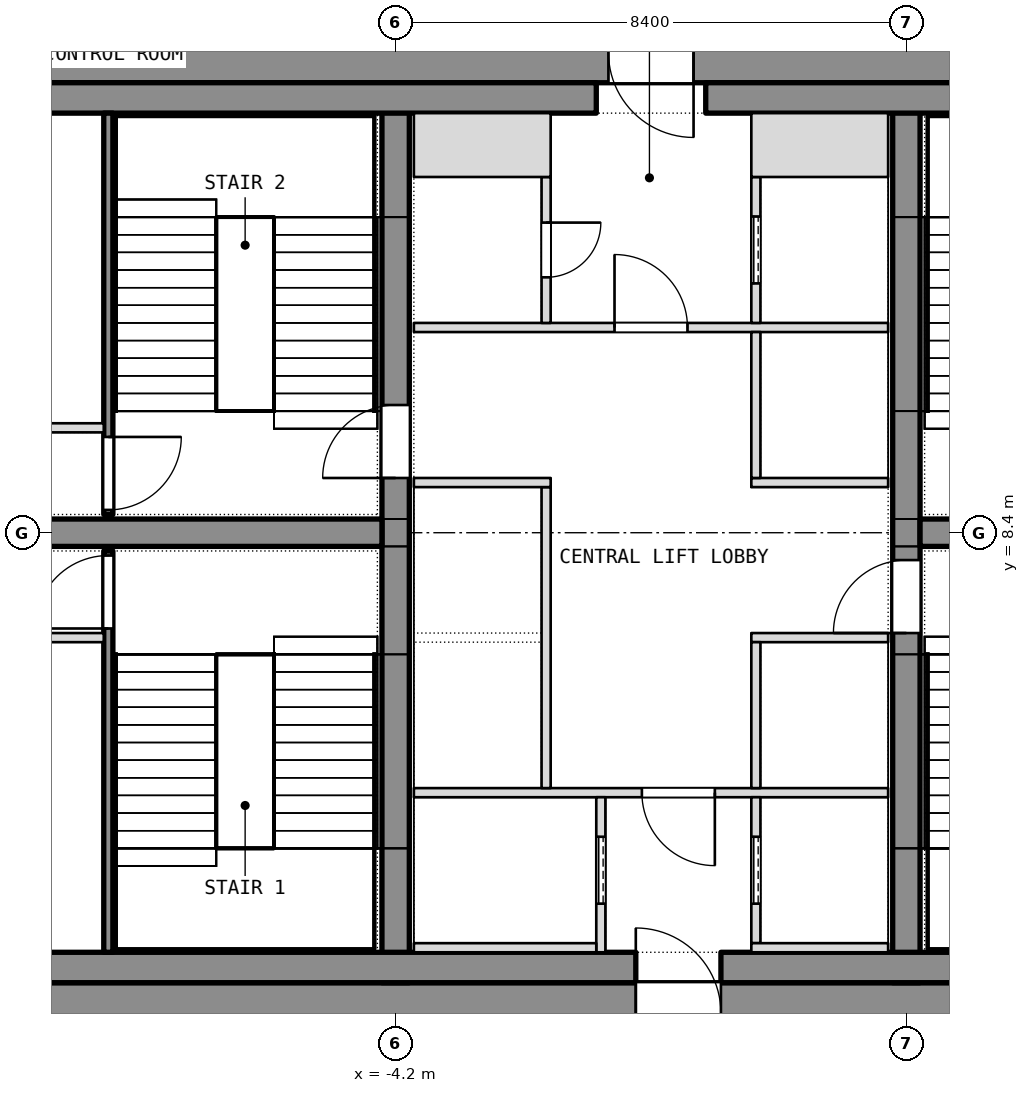
"""IFC4 building model, lengths in metres.
Left out: names, types, materials, properties, quantities, classifications, styles, units other than length and angle.
Written with IfcOpenShell. Run it as: python <this file> out.ifc"""

import sys

from ifc_helpers import new_model, si_unit, direction, frame, frame_2d, origin, place, context, subcontext, project, spatial, rectangle, extrude, element, fill, save


model = new_model("IFC4")
c1 = context("Model", 3, precision=1e-05, world=origin(), true_north=direction((0.0, 1.0)))
c2 = subcontext(c1, "Body", "Model", "MODEL_VIEW")
j1 = project(units=[si_unit("LENGTHUNIT", "METRE"), si_unit("PLANEANGLEUNIT", "RADIAN")], contexts=[c1])
p1 = place(None, origin())
s1 = spatial("IfcSite", under=j1, at=p1, CompositionType="ELEMENT")
p2 = place(p1, origin())
s2 = spatial("IfcBuilding", under=s1, at=p2, CompositionType="ELEMENT")
p3 = place(p2, frame((0.0, 0.0, 169.7)))
s3 = spatial("IfcBuildingStorey", under=s2, at=p3, CompositionType="ELEMENT", Elevation=169.7)
p4 = place(p3, frame((-11.1, 0.5, 0.0), z_axis=(0.0, 0.0, 1.0), x_axis=(1.0, 0.0, 0.0)))
e1 = element("IfcWall", 1, at=p4, inside=s3, PredefinedType="SHEAR", context=c2, shape_type="SweptSolid", body=[
    extrude(rectangle(XDim=22.2, YDim=1.0, at=frame_2d((11.1, 0.0))), origin(), (0.0, 0.0, 1.0), 10.8),
])
p5 = place(p4, frame((10.85, 0.0, 0.0)))
e2 = element("IfcOpeningElement", 2, at=p5, cuts=e1, PredefinedType="OPENING", context=c2, shape_type="SweptSolid", body=[
    extrude(rectangle(XDim=1.4, YDim=2.1, at=frame_2d((0.7, 1.05))), frame((0.0, 0.5, 0.0), z_axis=(0.0, -1.0, 0.0), x_axis=(1.0, 0.0, 0.0)), (0.0, 0.0, 1.0), 1.0),
])
p6 = place(p3, frame((-11.1, 16.3, 0.0), z_axis=(0.0, 0.0, 1.0), x_axis=(1.0, 0.0, 0.0)))
e3 = element("IfcWall", 3, at=p6, inside=s3, PredefinedType="SHEAR", context=c2, shape_type="SweptSolid", body=[
    extrude(rectangle(XDim=22.2, YDim=1.0, at=frame_2d((11.1, 0.0))), origin(), (0.0, 0.0, 1.0), 10.8),
])
p7 = place(p6, frame((10.4, 0.0, 0.0)))
e4 = element("IfcOpeningElement", 4, at=p7, cuts=e3, PredefinedType="OPENING", context=c2, shape_type="SweptSolid", body=[
    extrude(rectangle(XDim=1.4, YDim=2.1, at=frame_2d((0.7, 1.05))), frame((0.0, 0.5, 0.0), z_axis=(0.0, -1.0, 0.0), x_axis=(1.0, 0.0, 0.0)), (0.0, 0.0, 1.0), 1.0),
])
p8 = place(p3, frame((-4.2, 1.0, 0.0), z_axis=(0.0, 0.0, 1.0), x_axis=(0.0, 1.0, 0.0)))
e5 = element("IfcWall", 5, at=p8, inside=s3, PredefinedType="SHEAR", context=c2, shape_type="SweptSolid", body=[
    extrude(rectangle(XDim=14.8, YDim=0.45, at=frame_2d((7.4, 0.0))), origin(), (0.0, 0.0, 1.0), 10.8),
])
p9 = place(p8, frame((8.3, 0.0, 0.0)))
e6 = element("IfcOpeningElement", 6, at=p9, cuts=e5, PredefinedType="OPENING", context=c2, shape_type="SweptSolid", body=[
    extrude(rectangle(XDim=1.2, YDim=2.1, at=frame_2d((0.6, 1.05))), frame((0.0, 0.225, 0.0), z_axis=(0.0, -1.0, 0.0), x_axis=(1.0, 0.0, 0.0)), (0.0, 0.0, 1.0), 0.45),
])
p10 = place(p3, frame((4.2, 1.0, 0.0), z_axis=(0.0, 0.0, 1.0), x_axis=(0.0, 1.0, 0.0)))
e7 = element("IfcWall", 7, at=p10, inside=s3, PredefinedType="SHEAR", context=c2, shape_type="SweptSolid", body=[
    extrude(rectangle(XDim=14.8, YDim=0.45, at=frame_2d((7.4, 0.0))), origin(), (0.0, 0.0, 1.0), 10.8),
])
p11 = place(p10, frame((5.75, 0.0, 0.0)))
e8 = element("IfcOpeningElement", 8, at=p11, cuts=e7, PredefinedType="OPENING", context=c2, shape_type="SweptSolid", body=[
    extrude(rectangle(XDim=1.2, YDim=2.1, at=frame_2d((0.6, 1.05))), frame((0.0, 0.225, 0.0), z_axis=(0.0, -1.0, 0.0), x_axis=(1.0, 0.0, 0.0)), (0.0, 0.0, 1.0), 0.45),
])
for number, where, z_axis, x_axis in (
    (9, (-11.1, 8.4, 0.0), (0.0, 0.0, 1.0), (1.0, 0.0, 0.0)),
    (10, (4.425, 8.4, 0.0), (0.0, 0.0, 1.0), (1.0, 0.0, 0.0)),
):
    element("IfcWall", number, at=place(p3, frame(where, z_axis=z_axis, x_axis=x_axis)), inside=s3, PredefinedType="SHEAR", context=c2, shape_type="SweptSolid", body=[
        extrude(rectangle(XDim=6.675, YDim=0.45, at=frame_2d((3.337, 0.0))), origin(), (0.0, 0.0, 1.0), 10.8),
    ])
p12 = place(p3, frame((-11.1, 1.25, 0.0), z_axis=(0.0, 0.0, 1.0), x_axis=(1.0, 0.0, 0.0)))
e11 = element("IfcWall", 11, at=p12, inside=s3, PredefinedType="PARTITIONING", context=c2, shape_type="SweptSolid", body=[
    extrude(rectangle(XDim=10.85, YDim=0.5, at=frame_2d((5.425, 0.0))), origin(), (0.0, 0.0, 1.0), 10.54),
])
p13 = place(p3, frame((1.15, 1.25, 0.0), z_axis=(0.0, 0.0, 1.0), x_axis=(1.0, 0.0, 0.0)))
e12 = element("IfcWall", 12, at=p13, inside=s3, PredefinedType="PARTITIONING", context=c2, shape_type="SweptSolid", body=[
    extrude(rectangle(XDim=9.95, YDim=0.5, at=frame_2d((4.975, 0.0))), origin(), (0.0, 0.0, 1.0), 10.54),
])
for number, where, z_axis, x_axis in (
    (13, (-11.1, 15.55, 0.0), (0.0, 0.0, 1.0), (1.0, 0.0, 0.0)),
    (14, (0.9, 15.55, 0.0), (0.0, 0.0, 1.0), (1.0, 0.0, 0.0)),
):
    element("IfcWall", number, at=place(p3, frame(where, z_axis=z_axis, x_axis=x_axis)), inside=s3, PredefinedType="PARTITIONING", context=c2, shape_type="SweptSolid", body=[
        extrude(rectangle(XDim=10.2, YDim=0.5, at=frame_2d((5.1, 0.0))), origin(), (0.0, 0.0, 1.0), 10.54),
    ])
p14 = place(p3, frame((-8.925, 1.5, 0.0), z_axis=(0.0, 0.0, 1.0), x_axis=(0.0, 1.0, 0.0)))
e15 = element("IfcWall", 15, at=p14, inside=s3, PredefinedType="SHEAR", context=c2, shape_type="SweptSolid", body=[
    extrude(rectangle(XDim=6.6, YDim=0.15, at=frame_2d((3.3, 0.0))), origin(), (0.0, 0.0, 1.0), 10.54),
])
p15 = place(p14, frame((5.325, 0.0, 0.0)))
e16 = element("IfcOpeningElement", 16, at=p15, cuts=e15, PredefinedType="OPENING", context=c2, shape_type="SweptSolid", body=[
    extrude(rectangle(XDim=1.2, YDim=2.1, at=frame_2d((0.6, 1.05))), frame((0.0, 0.075, 0.0), z_axis=(0.0, -1.0, 0.0), x_axis=(1.0, 0.0, 0.0)), (0.0, 0.0, 1.0), 0.15),
])
p16 = place(p3, frame((-11.1, 6.675, 0.0), z_axis=(0.0, 0.0, 1.0), x_axis=(1.0, 0.0, 0.0)))
e17 = element("IfcWall", 17, at=p16, inside=s3, PredefinedType="PARTITIONING", context=c2, shape_type="SweptSolid", body=[
    extrude(rectangle(XDim=2.1, YDim=0.15, at=frame_2d((1.05, 0.0))), origin(), (0.0, 0.0, 1.0), 10.54),
])
p17 = place(p3, frame((-8.925, 8.7, 0.0), z_axis=(0.0, 0.0, 1.0), x_axis=(0.0, 1.0, 0.0)))
e18 = element("IfcWall", 18, at=p17, inside=s3, PredefinedType="SHEAR", context=c2, shape_type="SweptSolid", body=[
    extrude(rectangle(XDim=6.6, YDim=0.15, at=frame_2d((3.3, 0.0))), origin(), (0.0, 0.0, 1.0), 10.54),
])
p18 = place(p17, frame((0.075, 0.0, 0.0)))
e19 = element("IfcOpeningElement", 19, at=p18, cuts=e18, PredefinedType="OPENING", context=c2, shape_type="SweptSolid", body=[
    extrude(rectangle(XDim=1.2, YDim=2.1, at=frame_2d((0.6, 1.05))), frame((0.0, 0.075, 0.0), z_axis=(0.0, -1.0, 0.0), x_axis=(1.0, 0.0, 0.0)), (0.0, 0.0, 1.0), 0.15),
])
p19 = place(p3, frame((-11.1, 10.125, 0.0), z_axis=(0.0, 0.0, 1.0), x_axis=(1.0, 0.0, 0.0)))
e20 = element("IfcWall", 20, at=p19, inside=s3, PredefinedType="PARTITIONING", context=c2, shape_type="SweptSolid", body=[
    extrude(rectangle(XDim=2.1, YDim=0.15, at=frame_2d((1.05, 0.0))), origin(), (0.0, 0.0, 1.0), 10.54),
])
p20 = place(p3, frame((-3.9, 4.125, 0.0), z_axis=(0.0, 0.0, 1.0), x_axis=(1.0, 0.0, 0.0)))
e21 = element("IfcWall", 21, at=p20, inside=s3, PredefinedType="PARTITIONING", context=c2, shape_type="SweptSolid", body=[
    extrude(rectangle(XDim=7.8, YDim=0.15, at=frame_2d((3.9, 0.0))), origin(), (0.0, 0.0, 1.0), 10.54),
])
p21 = place(p20, frame((3.75, 0.0, 0.0)))
e22 = element("IfcOpeningElement", 22, at=p21, cuts=e21, PredefinedType="OPENING", context=c2, shape_type="SweptSolid", body=[
    extrude(rectangle(XDim=1.2, YDim=2.1, at=frame_2d((0.6, 1.05))), frame((0.0, 0.075, 0.0), z_axis=(0.0, -1.0, 0.0), x_axis=(1.0, 0.0, 0.0)), (0.0, 0.0, 1.0), 0.15),
])
p22 = place(p3, frame((-3.9, 11.775, 0.0), z_axis=(0.0, 0.0, 1.0), x_axis=(1.0, 0.0, 0.0)))
e23 = element("IfcWall", 23, at=p22, inside=s3, PredefinedType="PARTITIONING", context=c2, shape_type="SweptSolid", body=[
    extrude(rectangle(XDim=7.8, YDim=0.15, at=frame_2d((3.9, 0.0))), origin(), (0.0, 0.0, 1.0), 10.54),
])
p23 = place(p22, frame((3.3, 0.0, 0.0)))
e24 = element("IfcOpeningElement", 24, at=p23, cuts=e23, PredefinedType="OPENING", context=c2, shape_type="SweptSolid", body=[
    extrude(rectangle(XDim=1.2, YDim=2.1, at=frame_2d((0.6, 1.05))), frame((0.0, 0.075, 0.0), z_axis=(0.0, -1.0, 0.0), x_axis=(1.0, 0.0, 0.0)), (0.0, 0.0, 1.0), 0.15),
])
p24 = place(p3, frame((-0.825, 1.5, 0.0), z_axis=(0.0, 0.0, 1.0), x_axis=(0.0, 1.0, 0.0)))
e25 = element("IfcWall", 25, at=p24, inside=s3, PredefinedType="SHEAR", context=c2, shape_type="SweptSolid", body=[
    extrude(rectangle(XDim=2.55, YDim=0.15, at=frame_2d((1.275, 0.0))), origin(), (0.0, 0.0, 1.0), 10.8),
])
p25 = place(p24, frame((0.8, 0.0, 0.0)))
e26 = element("IfcOpeningElement", 26, at=p25, cuts=e25, PredefinedType="OPENING", context=c2, shape_type="SweptSolid", body=[
    extrude(rectangle(XDim=1.1, YDim=2.1, at=frame_2d((0.55, 1.05))), frame((0.0, 0.075, 0.0), z_axis=(0.0, -1.0, 0.0), x_axis=(1.0, 0.0, 0.0)), (0.0, 0.0, 1.0), 0.15),
])
p26 = place(p3, frame((-3.9, 1.575, 0.0), z_axis=(0.0, 0.0, 1.0), x_axis=(1.0, 0.0, 0.0)))
e27 = element("IfcWall", 27, at=p26, inside=s3, PredefinedType="SHEAR", context=c2, shape_type="SweptSolid", body=[
    extrude(rectangle(XDim=3.0, YDim=0.15, at=frame_2d((1.5, 0.0))), origin(), (0.0, 0.0, 1.0), 10.8),
])
p27 = place(p3, frame((-1.725, 4.2, 0.0), z_axis=(0.0, 0.0, 1.0), x_axis=(0.0, 1.0, 0.0)))
e28 = element("IfcWall", 28, at=p27, inside=s3, PredefinedType="SHEAR", context=c2, shape_type="SweptSolid", body=[
    extrude(rectangle(XDim=4.95, YDim=0.15, at=frame_2d((2.475, 0.0))), origin(), (0.0, 0.0, 1.0), 10.8),
])
p28 = place(p3, frame((-3.9, 9.225, 0.0), z_axis=(0.0, 0.0, 1.0), x_axis=(1.0, 0.0, 0.0)))
e29 = element("IfcWall", 29, at=p28, inside=s3, PredefinedType="SHEAR", context=c2, shape_type="SweptSolid", body=[
    extrude(rectangle(XDim=2.25, YDim=0.15, at=frame_2d((1.125, 0.0))), origin(), (0.0, 0.0, 1.0), 10.8),
])
p29 = place(p3, frame((-1.725, 11.85, 0.0), z_axis=(0.0, 0.0, 1.0), x_axis=(0.0, 1.0, 0.0)))
e30 = element("IfcWall", 30, at=p29, inside=s3, PredefinedType="PARTITIONING", context=c2, shape_type="SweptSolid", body=[
    extrude(rectangle(XDim=2.4, YDim=0.15, at=frame_2d((1.2, 0.0))), origin(), (0.0, 0.0, 1.0), 10.54),
])
p30 = place(p29, frame((0.75, 0.0, 0.0)))
e31 = element("IfcOpeningElement", 31, at=p30, cuts=e30, PredefinedType="OPENING", context=c2, shape_type="SweptSolid", body=[
    extrude(rectangle(XDim=0.9, YDim=2.1, at=frame_2d((0.45, 1.05))), frame((0.0, 0.075, 0.0), z_axis=(0.0, -1.0, 0.0), x_axis=(1.0, 0.0, 0.0)), (0.0, 0.0, 1.0), 0.15),
])
p31 = place(p3, frame((-3.9, 14.775, 0.0), z_axis=(0.0, 0.0, 1.0), x_axis=(1.0, 0.0, 0.0)))
e32 = element("IfcWall", 32, at=p31, inside=s3, PredefinedType="PARTITIONING", context=c2, shape_type="SweptSolid", body=[
    extrude(rectangle(XDim=2.25, YDim=1.05, at=frame_2d((1.125, 0.0))), origin(), (0.0, 0.0, 1.0), 10.54),
])
p32 = place(p3, frame((1.725, 1.65, 0.0), z_axis=(0.0, 0.0, 1.0), x_axis=(0.0, 1.0, 0.0)))
e33 = element("IfcWall", 33, at=p32, inside=s3, PredefinedType="SHEAR", context=c2, shape_type="SweptSolid", body=[
    extrude(rectangle(XDim=2.4, YDim=0.15, at=frame_2d((1.2, 0.0))), origin(), (0.0, 0.0, 1.0), 10.8),
])
p33 = place(p32, frame((0.65, 0.0, 0.0)))
e34 = element("IfcOpeningElement", 34, at=p33, cuts=e33, PredefinedType="OPENING", context=c2, shape_type="SweptSolid", body=[
    extrude(rectangle(XDim=1.1, YDim=2.1, at=frame_2d((0.55, 1.05))), frame((0.0, 0.075, 0.0), z_axis=(0.0, -1.0, 0.0), x_axis=(1.0, 0.0, 0.0)), (0.0, 0.0, 1.0), 0.15),
])
p34 = place(p3, frame((1.65, 1.575, 0.0), z_axis=(0.0, 0.0, 1.0), x_axis=(1.0, 0.0, 0.0)))
e35 = element("IfcWall", 35, at=p34, inside=s3, PredefinedType="SHEAR", context=c2, shape_type="SweptSolid", body=[
    extrude(rectangle(XDim=2.25, YDim=0.15, at=frame_2d((1.125, 0.0))), origin(), (0.0, 0.0, 1.0), 10.8),
])
p35 = place(p3, frame((1.725, 11.85, 0.0), z_axis=(0.0, 0.0, 1.0), x_axis=(0.0, 1.0, 0.0)))
e36 = element("IfcWall", 36, at=p35, inside=s3, PredefinedType="SHEAR", context=c2, shape_type="SweptSolid", body=[
    extrude(rectangle(XDim=2.4, YDim=0.15, at=frame_2d((1.2, 0.0))), origin(), (0.0, 0.0, 1.0), 10.8),
])
p36 = place(p35, frame((0.65, 0.0, 0.0)))
e37 = element("IfcOpeningElement", 37, at=p36, cuts=e36, PredefinedType="OPENING", context=c2, shape_type="SweptSolid", body=[
    extrude(rectangle(XDim=1.1, YDim=2.1, at=frame_2d((0.55, 1.05))), frame((0.0, 0.075, 0.0), z_axis=(0.0, -1.0, 0.0), x_axis=(1.0, 0.0, 0.0)), (0.0, 0.0, 1.0), 0.15),
])
p37 = place(p3, frame((1.65, 14.775, 0.0), z_axis=(0.0, 0.0, 1.0), x_axis=(1.0, 0.0, 0.0)))
e38 = element("IfcWall", 38, at=p37, inside=s3, PredefinedType="SHEAR", context=c2, shape_type="SweptSolid", body=[
    extrude(rectangle(XDim=2.25, YDim=1.05, at=frame_2d((1.125, 0.0))), origin(), (0.0, 0.0, 1.0), 10.8),
])
for number, where, z_axis, x_axis in (
    (39, (1.65, 6.675, 0.0), (0.0, 0.0, 1.0), (1.0, 0.0, 0.0)),
    (40, (1.65, 9.225, 0.0), (0.0, 0.0, 1.0), (1.0, 0.0, 0.0)),
):
    element("IfcWall", number, at=place(p3, frame(where, z_axis=z_axis, x_axis=x_axis)), inside=s3, PredefinedType="SHEAR", context=c2, shape_type="SweptSolid", body=[
        extrude(rectangle(XDim=2.25, YDim=0.15, at=frame_2d((1.125, 0.0))), origin(), (0.0, 0.0, 1.0), 10.8),
    ])
p38 = place(p3, frame((1.725, 4.2, 0.0), z_axis=(0.0, 0.0, 1.0), x_axis=(0.0, 1.0, 0.0)))
e41 = element("IfcWall", 41, at=p38, inside=s3, PredefinedType="SHEAR", context=c2, shape_type="SweptSolid", body=[
    extrude(rectangle(XDim=2.4, YDim=0.15, at=frame_2d((1.2, 0.0))), origin(), (0.0, 0.0, 1.0), 10.8),
])
p39 = place(p3, frame((1.725, 9.3, 0.0), z_axis=(0.0, 0.0, 1.0), x_axis=(0.0, 1.0, 0.0)))
e42 = element("IfcWall", 42, at=p39, inside=s3, PredefinedType="SHEAR", context=c2, shape_type="SweptSolid", body=[
    extrude(rectangle(XDim=2.4, YDim=0.15, at=frame_2d((1.2, 0.0))), origin(), (0.0, 0.0, 1.0), 10.8),
])
p40 = place(p15, origin())
e43 = element("IfcDoor", 43, at=p40, inside=s3, OperationType="SINGLE_SWING_LEFT", PredefinedType="DOOR", context=c2, shape_type="SweptSolid", body=[
    extrude(rectangle(XDim=1.2, YDim=2.1, at=frame_2d((0.6, 1.05))), frame((0.0, 0.025, 0.0), z_axis=(0.0, -1.0, 0.0), x_axis=(1.0, 0.0, 0.0)), (0.0, 0.0, 1.0), 0.05),
])
fill(e16, e43)
p41 = place(p18, origin())
e44 = element("IfcDoor", 44, at=p41, inside=s3, OperationType="SINGLE_SWING_LEFT", PredefinedType="DOOR", context=c2, shape_type="SweptSolid", body=[
    extrude(rectangle(XDim=1.2, YDim=2.1, at=frame_2d((0.6, 1.05))), frame((0.0, 0.025, 0.0), z_axis=(0.0, -1.0, 0.0), x_axis=(1.0, 0.0, 0.0)), (0.0, 0.0, 1.0), 0.05),
])
fill(e19, e44)
p42 = place(p25, origin())
e45 = element("IfcDoor", 45, at=p42, inside=s3, OperationType="SLIDING_TO_LEFT", PredefinedType="DOOR", context=c2, shape_type="SweptSolid", body=[
    extrude(rectangle(XDim=1.1, YDim=2.1, at=frame_2d((0.55, 1.05))), frame((0.0, 0.025, 0.0), z_axis=(0.0, -1.0, 0.0), x_axis=(1.0, 0.0, 0.0)), (0.0, 0.0, 1.0), 0.05),
])
fill(e26, e45)
p43 = place(p33, origin())
e46 = element("IfcDoor", 46, at=p43, inside=s3, OperationType="SLIDING_TO_LEFT", PredefinedType="DOOR", context=c2, shape_type="SweptSolid", body=[
    extrude(rectangle(XDim=1.1, YDim=2.1, at=frame_2d((0.55, 1.05))), frame((0.0, 0.025, 0.0), z_axis=(0.0, -1.0, 0.0), x_axis=(1.0, 0.0, 0.0)), (0.0, 0.0, 1.0), 0.05),
])
fill(e34, e46)
p44 = place(p36, origin())
e47 = element("IfcDoor", 47, at=p44, inside=s3, OperationType="SLIDING_TO_LEFT", PredefinedType="DOOR", context=c2, shape_type="SweptSolid", body=[
    extrude(rectangle(XDim=1.1, YDim=2.1, at=frame_2d((0.55, 1.05))), frame((0.0, 0.025, 0.0), z_axis=(0.0, -1.0, 0.0), x_axis=(1.0, 0.0, 0.0)), (0.0, 0.0, 1.0), 0.05),
])
fill(e37, e47)
p45 = place(p21, origin())
e48 = element("IfcDoor", 48, at=p45, inside=s3, OperationType="SINGLE_SWING_LEFT", PredefinedType="DOOR", context=c2, shape_type="SweptSolid", body=[
    extrude(rectangle(XDim=1.2, YDim=2.1, at=frame_2d((0.6, 1.05))), frame((0.0, 0.025, 0.0), z_axis=(0.0, -1.0, 0.0), x_axis=(1.0, 0.0, 0.0)), (0.0, 0.0, 1.0), 0.05),
])
fill(e22, e48)
p46 = place(p23, origin())
e49 = element("IfcDoor", 49, at=p46, inside=s3, OperationType="SINGLE_SWING_LEFT", PredefinedType="DOOR", context=c2, shape_type="SweptSolid", body=[
    extrude(rectangle(XDim=1.2, YDim=2.1, at=frame_2d((0.6, 1.05))), frame((0.0, 0.025, 0.0), z_axis=(0.0, -1.0, 0.0), x_axis=(1.0, 0.0, 0.0)), (0.0, 0.0, 1.0), 0.05),
])
fill(e24, e49)
p47 = place(p30, origin())
e50 = element("IfcDoor", 50, at=p47, inside=s3, OperationType="SINGLE_SWING_LEFT", PredefinedType="DOOR", context=c2, shape_type="SweptSolid", body=[
    extrude(rectangle(XDim=0.9, YDim=2.1, at=frame_2d((0.45, 1.05))), frame((0.0, 0.025, 0.0), z_axis=(0.0, -1.0, 0.0), x_axis=(1.0, 0.0, 0.0)), (0.0, 0.0, 1.0), 0.05),
])
fill(e31, e50)
p48 = place(p9, origin())
e51 = element("IfcDoor", 51, at=p48, inside=s3, OperationType="SINGLE_SWING_LEFT", PredefinedType="DOOR", context=c2, shape_type="SweptSolid", body=[
    extrude(rectangle(XDim=1.2, YDim=2.1, at=frame_2d((0.6, 1.05))), frame((0.0, 0.025, 0.0), z_axis=(0.0, -1.0, 0.0), x_axis=(1.0, 0.0, 0.0)), (0.0, 0.0, 1.0), 0.05),
])
fill(e6, e51)
p49 = place(p11, origin())
e52 = element("IfcDoor", 52, at=p49, inside=s3, OperationType="SINGLE_SWING_LEFT", PredefinedType="DOOR", context=c2, shape_type="SweptSolid", body=[
    extrude(rectangle(XDim=1.2, YDim=2.1, at=frame_2d((0.6, 1.05))), frame((0.0, 0.025, 0.0), z_axis=(0.0, -1.0, 0.0), x_axis=(1.0, 0.0, 0.0)), (0.0, 0.0, 1.0), 0.05),
])
fill(e8, e52)
p50 = place(p7, origin())
e53 = element("IfcDoor", 53, at=p50, inside=s3, OperationType="SINGLE_SWING_LEFT", PredefinedType="DOOR", context=c2, shape_type="SweptSolid", body=[
    extrude(rectangle(XDim=1.4, YDim=2.1, at=frame_2d((0.7, 1.05))), frame((0.0, 0.025, 0.0), z_axis=(0.0, -1.0, 0.0), x_axis=(1.0, 0.0, 0.0)), (0.0, 0.0, 1.0), 0.05),
])
fill(e4, e53)
p51 = place(p5, origin())
e54 = element("IfcDoor", 54, at=p51, inside=s3, OperationType="SINGLE_SWING_LEFT", PredefinedType="DOOR", context=c2, shape_type="SweptSolid", body=[
    extrude(rectangle(XDim=1.4, YDim=2.1, at=frame_2d((0.7, 1.05))), frame((0.0, 0.025, 0.0), z_axis=(0.0, -1.0, 0.0), x_axis=(1.0, 0.0, 0.0)), (0.0, 0.0, 1.0), 0.05),
])
fill(e2, e54)
save(model, sys.argv[1])
